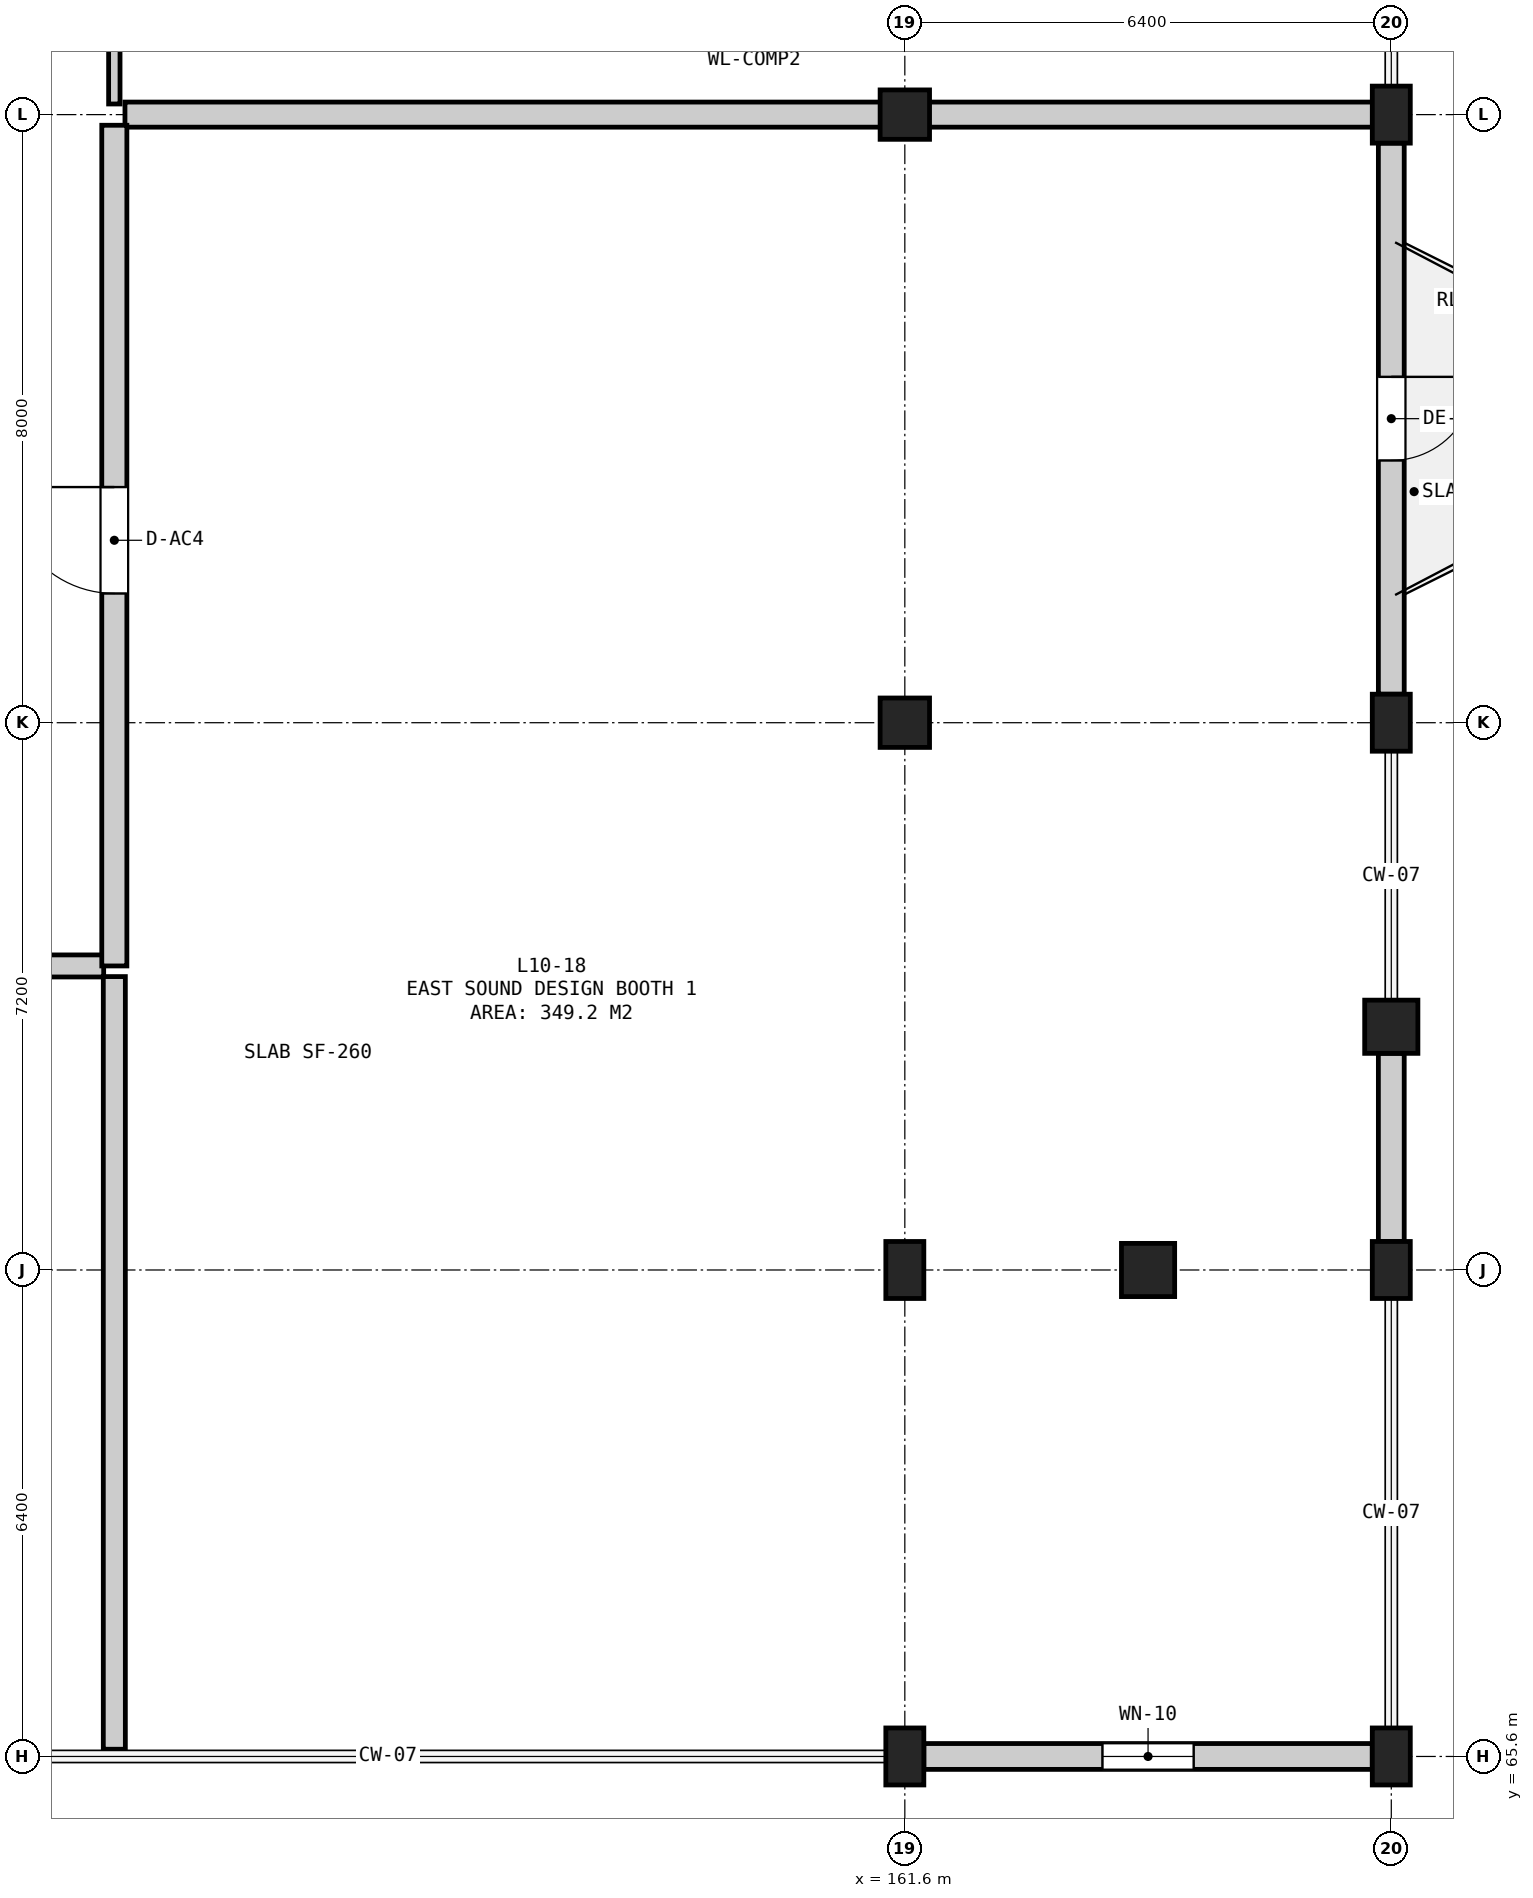
"""IFC4 building model, lengths in metres.
Left out: names, types, materials, properties, quantities, classifications, styles, units other than length and angle.
Written with IfcOpenShell. Run it as: python <this file> out.ifc"""

import sys

from ifc_helpers import new_model, si_unit, direction, frame, frame_2d, origin, origin_2d, place, context, subcontext, project, spatial, rectangle, circle, extrude, element, fill, save


model = new_model("IFC4")
c1 = context("Model", 3, precision=1e-05, world=origin(), true_north=direction((0.0, 1.0)))
c2 = subcontext(c1, "Body", "Model", "MODEL_VIEW")
j1 = project(units=[si_unit("LENGTHUNIT", "METRE"), si_unit("PLANEANGLEUNIT", "RADIAN")], contexts=[c1])
p1 = place(None, origin())
s1 = spatial("IfcSite", under=j1, at=p1, CompositionType="ELEMENT")
p2 = place(p1, origin())
s2 = spatial("IfcBuilding", under=s1, at=p2, CompositionType="ELEMENT")
p3 = place(p2, frame((0.0, 0.0, 43.3)))
s3 = spatial("IfcBuildingStorey", under=s2, at=p3, CompositionType="ELEMENT", Elevation=43.3)
for number, where, z_axis, x_axis in (
    (1, (161.6, 65.6, 0.0), (0.0, 0.0, 1.0), (1.0, 0.0, 0.0)),
    (2, (161.6, 72.0, 0.0), (0.0, 0.0, 1.0), (1.0, 0.0, 0.0)),
):
    element("IfcColumn", number, at=place(p3, frame(where, z_axis=z_axis, x_axis=x_axis)), inside=s3, PredefinedType="COLUMN", context=c2, shape_type="SweptSolid", body=[
        extrude(rectangle(XDim=0.5, YDim=0.75, at=origin_2d()), origin(), (0.0, 0.0, 1.0), 3.8),
    ])
for number, where, z_axis, x_axis in (
    (3, (161.6, 79.2, 0.0), (0.0, 0.0, 1.0), (1.0, 0.0, 0.0)),
    (4, (161.6, 87.2, 0.0), (0.0, 0.0, 1.0), (1.0, 0.0, 0.0)),
):
    element("IfcColumn", number, at=place(p3, frame(where, z_axis=z_axis, x_axis=x_axis)), inside=s3, PredefinedType="COLUMN", context=c2, shape_type="SweptSolid", body=[
        extrude(rectangle(XDim=0.65, YDim=0.65, at=origin_2d()), origin(), (0.0, 0.0, 1.0), 3.8),
    ])
p4 = place(p3, frame((164.8, 72.0, 0.0), z_axis=(0.0, 0.0, 1.0), x_axis=(1.0, 0.0, 0.0)))
e5 = element("IfcColumn", 5, at=p4, inside=s3, PredefinedType="COLUMN", context=c2, shape_type="SweptSolid", body=[
    extrude(circle(Radius=0.35, at=origin_2d()), origin(), (0.0, 0.0, 1.0), 3.8),
])
for number, where, z_axis, x_axis in (
    (6, (168.0, 65.6, 0.0), (0.0, 0.0, 1.0), (1.0, 0.0, 0.0)),
    (7, (168.0, 72.0, 0.0), (0.0, 0.0, 1.0), (1.0, 0.0, 0.0)),
):
    element("IfcColumn", number, at=place(p3, frame(where, z_axis=z_axis, x_axis=x_axis)), inside=s3, PredefinedType="COLUMN", context=c2, shape_type="SweptSolid", body=[
        extrude(rectangle(XDim=0.5, YDim=0.75, at=origin_2d()), origin(), (0.0, 0.0, 1.0), 3.8),
    ])
p5 = place(p3, frame((168.0, 75.2, 0.0), z_axis=(0.0, 0.0, 1.0), x_axis=(1.0, 0.0, 0.0)))
e8 = element("IfcColumn", 8, at=p5, inside=s3, PredefinedType="COLUMN", context=c2, shape_type="SweptSolid", body=[
    extrude(circle(Radius=0.35, at=origin_2d()), origin(), (0.0, 0.0, 1.0), 3.8),
])
for number, where, z_axis, x_axis in (
    (9, (168.0, 79.2, 0.0), (0.0, 0.0, 1.0), (1.0, 0.0, 0.0)),
    (10, (168.0, 87.2, 0.0), (0.0, 0.0, 1.0), (1.0, 0.0, 0.0)),
):
    element("IfcColumn", number, at=place(p3, frame(where, z_axis=z_axis, x_axis=x_axis)), inside=s3, PredefinedType="COLUMN", context=c2, shape_type="SweptSolid", body=[
        extrude(rectangle(XDim=0.5, YDim=0.75, at=origin_2d()), origin(), (0.0, 0.0, 1.0), 3.8),
    ])
p6 = place(p3, frame((161.85, 65.6, 0.0), z_axis=(0.0, 0.0, 1.0), x_axis=(1.0, 0.0, 0.0)))
e11 = element("IfcWall", 11, at=p6, inside=s3, PredefinedType="SOLIDWALL", context=c2, shape_type="SweptSolid", body=[
    extrude(rectangle(XDim=5.9, YDim=0.34, at=frame_2d((2.95, 0.0))), origin(), (0.0, 0.0, 1.0), 2.9),
])
p7 = place(p6, frame((2.35, 0.0, 0.9)))
e12 = element("IfcOpeningElement", 12, at=p7, cuts=e11, PredefinedType="OPENING", context=c2, shape_type="SweptSolid", body=[
    extrude(rectangle(XDim=1.2, YDim=1.7, at=frame_2d((0.6, 0.85))), frame((0.0, 0.182, 0.0), z_axis=(0.0, -1.0, 0.0), x_axis=(1.0, 0.0, 0.0)), (0.0, 0.0, 1.0), 0.364),
])
p8 = place(p3, frame((168.0, 72.375, 0.0), z_axis=(0.0, 0.0, 1.0), x_axis=(0.0, 1.0, 0.0)))
e13 = element("IfcWall", 13, at=p8, inside=s3, PredefinedType="SOLIDWALL", context=c2, shape_type="SweptSolid", body=[
    extrude(rectangle(XDim=2.475, YDim=0.34, at=frame_2d((1.238, 0.0))), origin(), (0.0, 0.0, 1.0), 2.9),
])
p9 = place(p3, frame((168.0, 79.575, 0.0), z_axis=(0.0, 0.0, 1.0), x_axis=(0.0, 1.0, 0.0)))
e14 = element("IfcWall", 14, at=p9, inside=s3, PredefinedType="SOLIDWALL", context=c2, shape_type="SweptSolid", body=[
    extrude(rectangle(XDim=7.25, YDim=0.34, at=frame_2d((3.625, 0.0))), origin(), (0.0, 0.0, 1.0), 2.885),
])
p10 = place(p9, frame((3.075, 0.0, 0.0)))
e15 = element("IfcOpeningElement", 15, at=p10, cuts=e14, PredefinedType="OPENING", context=c2, shape_type="SweptSolid", body=[
    extrude(rectangle(XDim=1.1, YDim=2.2, at=frame_2d((0.55, 1.1))), frame((0.0, 0.182, 0.0), z_axis=(0.0, -1.0, 0.0), x_axis=(1.0, 0.0, 0.0)), (0.0, 0.0, 1.0), 0.364),
])
p11 = place(p3, frame((139.74, 76.0, 0.0), z_axis=(0.0, 0.0, 1.0), x_axis=(1.0, 0.0, 0.0)))
e16 = element("IfcWall", 16, at=p11, inside=s3, PredefinedType="SOLIDWALL", context=c2, shape_type="SweptSolid", body=[
    extrude(rectangle(XDim=11.32, YDim=0.29, at=frame_2d((5.66, 0.0))), origin(), (0.0, 0.0, 1.0), 3.52),
])
p12 = place(p11, frame((4.96, 0.0, 0.0)))
e17 = element("IfcOpeningElement", 17, at=p12, cuts=e16, PredefinedType="OPENING", context=c2, shape_type="SweptSolid", body=[
    extrude(rectangle(XDim=1.4, YDim=2.2, at=frame_2d((0.7, 1.1))), frame((0.0, 0.157, 0.0), z_axis=(0.0, -1.0, 0.0), x_axis=(1.0, 0.0, 0.0)), (0.0, 0.0, 1.0), 0.314),
])
p13 = place(p3, frame((151.2, 65.695, 0.0), z_axis=(0.0, 0.0, 1.0), x_axis=(0.0, 1.0, 0.0)))
e18 = element("IfcWall", 18, at=p13, inside=s3, PredefinedType="SOLIDWALL", context=c2, shape_type="SweptSolid", body=[
    extrude(rectangle(XDim=10.165, YDim=0.29, at=frame_2d((5.083, 0.0))), origin(), (0.0, 0.0, 1.0), 3.52),
])
p14 = place(p3, frame((151.34, 87.2, 0.0), z_axis=(0.0, 0.0, 1.0), x_axis=(1.0, 0.0, 0.0)))
e19 = element("IfcWall", 19, at=p14, inside=s3, PredefinedType="SOLIDWALL", context=c2, shape_type="SweptSolid", body=[
    extrude(rectangle(XDim=16.555, YDim=0.33, at=frame_2d((8.277, 0.0))), origin(), (0.0, 0.0, 1.0), 2.445),
])
p15 = place(p3, frame((151.2, 76.0, 0.0), z_axis=(0.0, 0.0, 1.0), x_axis=(0.0, 1.0, 0.0)))
e20 = element("IfcWall", 20, at=p15, inside=s3, PredefinedType="SOLIDWALL", context=c2, shape_type="SweptSolid", body=[
    extrude(rectangle(XDim=11.06, YDim=0.33, at=frame_2d((5.53, 0.0))), origin(), (0.0, 0.0, 1.0), 3.52),
])
p16 = place(p15, frame((4.9, 0.0, 0.0)))
e21 = element("IfcOpeningElement", 21, at=p16, cuts=e20, PredefinedType="OPENING", context=c2, shape_type="SweptSolid", body=[
    extrude(rectangle(XDim=1.4, YDim=2.2, at=frame_2d((0.7, 1.1))), frame((0.0, 0.177, 0.0), z_axis=(0.0, -1.0, 0.0), x_axis=(1.0, 0.0, 0.0)), (0.0, 0.0, 1.0), 0.354),
])
p17 = place(p3, frame((151.2, 87.34, 0.0), z_axis=(0.0, 0.0, 1.0), x_axis=(0.0, 1.0, 0.0)))
e22 = element("IfcWall", 22, at=p17, inside=s3, PredefinedType="PARTITIONING", context=c2, shape_type="SweptSolid", body=[
    extrude(rectangle(XDim=10.92, YDim=0.15, at=frame_2d((5.46, 0.0))), origin(), (0.0, 0.0, 1.0), 3.52),
])
p18 = place(p17, frame((4.935, 0.0, 0.0)))
e23 = element("IfcOpeningElement", 23, at=p18, cuts=e22, PredefinedType="OPENING", context=c2, shape_type="SweptSolid", body=[
    extrude(rectangle(XDim=1.05, YDim=2.15, at=frame_2d((0.525, 1.075))), frame((0.0, 0.087, 0.0), z_axis=(0.0, -1.0, 0.0), x_axis=(1.0, 0.0, 0.0)), (0.0, 0.0, 1.0), 0.174),
])
p19 = place(p7, origin())
e24 = element("IfcWindow", 24, at=p19, inside=s3, PartitioningType="SINGLE_PANEL", PredefinedType="WINDOW", context=c2, shape_type="SweptSolid", body=[
    extrude(rectangle(XDim=1.2, YDim=1.7, at=frame_2d((0.6, 0.85))), frame((0.0, 0.03, 0.0), z_axis=(0.0, -1.0, 0.0), x_axis=(1.0, 0.0, 0.0)), (0.0, 0.0, 1.0), 0.06),
])
fill(e12, e24)
p20 = place(p10, frame((1.1, 0.0, 0.0), z_axis=(0.0, 0.0, 1.0), x_axis=(-1.0, 0.0, 0.0)))
e25 = element("IfcDoor", 25, at=p20, inside=s3, OperationType="SINGLE_SWING_LEFT", PredefinedType="DOOR", context=c2, shape_type="SweptSolid", body=[
    extrude(rectangle(XDim=1.1, YDim=2.2, at=frame_2d((0.55, 1.1))), frame((0.0, 0.025, 0.0), z_axis=(0.0, -1.0, 0.0), x_axis=(1.0, 0.0, 0.0)), (0.0, 0.0, 1.0), 0.05),
])
fill(e15, e25)
p21 = place(p16, origin())
e26 = element("IfcDoor", 26, at=p21, inside=s3, OperationType="SINGLE_SWING_RIGHT", PredefinedType="DOOR", context=c2, shape_type="SweptSolid", body=[
    extrude(rectangle(XDim=1.4, YDim=2.2, at=frame_2d((0.7, 1.1))), frame((0.0, 0.025, 0.0), z_axis=(0.0, -1.0, 0.0), x_axis=(1.0, 0.0, 0.0)), (0.0, 0.0, 1.0), 0.05),
])
fill(e21, e26)
save(model, sys.argv[1])
